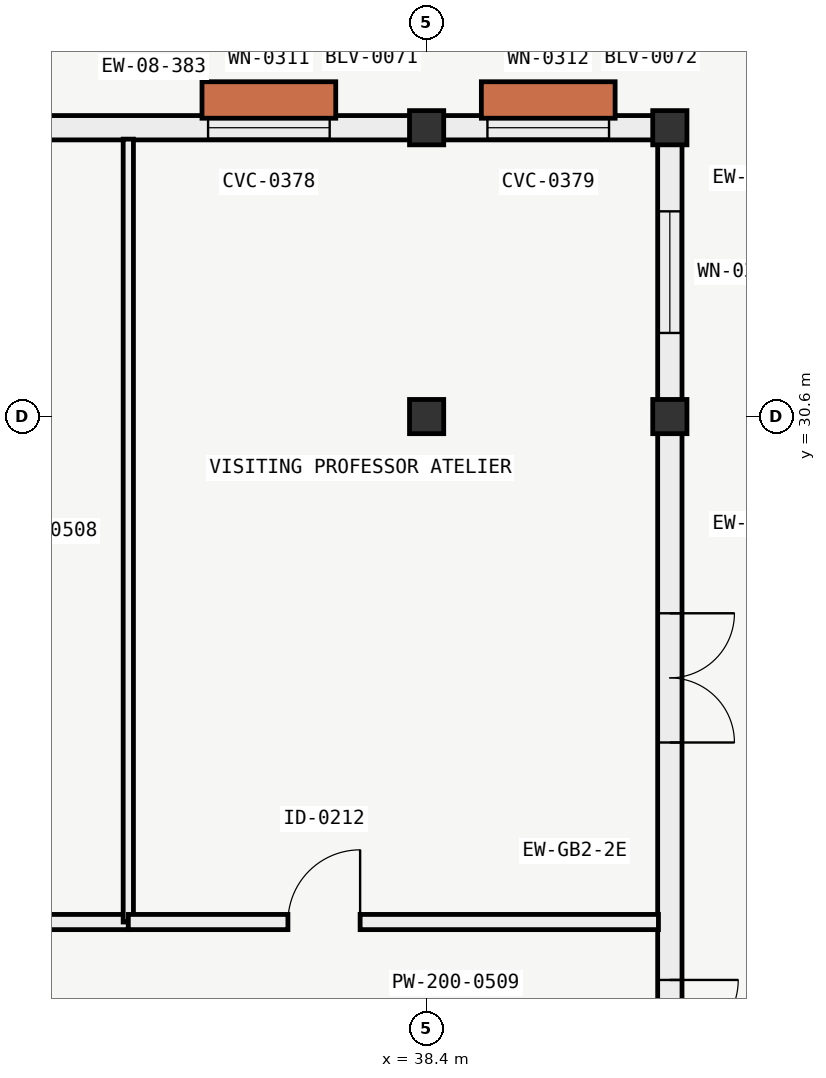
"""IFC4 building model, lengths in metres.
Left out: names, types, materials, properties, quantities, classifications, styles, units other than length and angle.
Written with IfcOpenShell. Run it as: python <this file> out.ifc"""

import sys

from ifc_helpers import new_model, si_unit, direction, frame, frame_2d, origin, origin_2d, place, context, subcontext, project, spatial, polyline, rectangle, outline, extrude, element, fill, save


model = new_model("IFC4")
c1 = context("Model", 3, precision=1e-05, world=origin(), true_north=direction((0.0, 1.0)))
c2 = subcontext(c1, "Body", "Model", "MODEL_VIEW")
j1 = project(units=[si_unit("LENGTHUNIT", "METRE"), si_unit("PLANEANGLEUNIT", "RADIAN")], contexts=[c1])
p1 = place(None, origin())
s1 = spatial("IfcSite", under=j1, at=p1, CompositionType="ELEMENT")
p2 = place(p1, origin())
s2 = spatial("IfcBuilding", under=s1, at=p2, CompositionType="ELEMENT")
p3 = place(p2, frame((0.0, 0.0, 30.6)))
s3 = spatial("IfcBuildingStorey", under=s2, at=p3, CompositionType="ELEMENT", Elevation=30.6)
for number, where, z_axis, x_axis in (
    (1, (38.4, 30.6, 0.0), (0.0, 0.0, 1.0), (1.0, 0.0, 0.0)),
    (2, (38.4, 34.4, 0.0), (0.0, 0.0, 1.0), (1.0, 0.0, 0.0)),
    (3, (41.6, 30.6, 0.0), (0.0, 0.0, 1.0), (1.0, 0.0, 0.0)),
    (4, (41.6, 34.4, 0.0), (0.0, 0.0, 1.0), (1.0, 0.0, 0.0)),
):
    element("IfcColumn", number, at=place(p3, frame(where, z_axis=z_axis, x_axis=x_axis)), inside=s3, PredefinedType="COLUMN", context=c2, shape_type="SweptSolid", body=[
        extrude(rectangle(XDim=0.45, YDim=0.45, at=origin_2d()), origin(), (0.0, 0.0, 1.0), 4.2),
    ])
p4 = place(p3, frame((41.6, 23.95, 0.0), z_axis=(0.0, 0.0, 1.0), x_axis=(0.0, -1.0, 0.0)))
e5 = element("IfcWall", 5, at=p4, inside=s3, PredefinedType="SOLIDWALL", context=c2, shape_type="SweptSolid", body=[
    extrude(rectangle(XDim=3.324, YDim=0.28, at=frame_2d((1.662, 0.0))), origin(), (0.0, 0.0, 1.0), 3.3),
])
p5 = place(p4, frame((0.762, 0.0, 0.0)))
e6 = element("IfcOpeningElement", 6, at=p5, cuts=e5, PredefinedType="OPENING", context=c2, shape_type="SweptSolid", body=[
    extrude(rectangle(XDim=1.8, YDim=2.2, at=frame_2d((0.9, 1.1))), frame((0.0, 0.15, 0.0), z_axis=(0.0, -1.0, 0.0), x_axis=(1.0, 0.0, 0.0)), (0.0, 0.0, 1.0), 0.3),
])
p6 = place(p3, frame((41.6, 30.374, 0.0), z_axis=(0.0, 0.0, 1.0), x_axis=(0.0, -1.0, 0.0)))
e7 = element("IfcWall", 7, at=p6, inside=s3, PredefinedType="SOLIDWALL", context=c2, shape_type="SweptSolid", body=[
    extrude(rectangle(XDim=6.424, YDim=0.28, at=frame_2d((3.212, 0.0))), origin(), (0.0, 0.0, 1.0), 3.3),
])
p7 = place(p6, frame((2.362, 0.0, 0.0)))
e8 = element("IfcOpeningElement", 8, at=p7, cuts=e7, PredefinedType="OPENING", context=c2, shape_type="SweptSolid", body=[
    extrude(rectangle(XDim=1.7, YDim=2.15, at=frame_2d((0.85, 1.075))), frame((0.0, 0.15, 0.0), z_axis=(0.0, -1.0, 0.0), x_axis=(1.0, 0.0, 0.0)), (0.0, 0.0, 1.0), 0.3),
])
p8 = place(p3, frame((41.6, 34.174, 0.0), z_axis=(0.0, 0.0, 1.0), x_axis=(0.0, -1.0, 0.0)))
e9 = element("IfcWall", 9, at=p8, inside=s3, PredefinedType="SOLIDWALL", context=c2, shape_type="SweptSolid", body=[
    extrude(rectangle(XDim=3.348, YDim=0.28, at=frame_2d((1.674, 0.0))), origin(), (0.0, 0.0, 1.0), 3.3),
])
p9 = place(p8, frame((0.874, 0.0, 0.85)))
e10 = element("IfcOpeningElement", 10, at=p9, cuts=e9, PredefinedType="OPENING", context=c2, shape_type="SweptSolid", body=[
    extrude(rectangle(XDim=1.6, YDim=1.9, at=frame_2d((0.8, 0.95))), frame((0.0, 0.15, 0.0), z_axis=(0.0, -1.0, 0.0), x_axis=(1.0, 0.0, 0.0)), (0.0, 0.0, 1.0), 0.3),
])
p10 = place(p3, frame((29.026, 34.4, 0.0), z_axis=(0.0, 0.0, 1.0), x_axis=(1.0, 0.0, 0.0)))
e11 = element("IfcWall", 11, at=p10, inside=s3, PredefinedType="SOLIDWALL", context=c2, shape_type="SweptSolid", body=[
    extrude(rectangle(XDim=5.449, YDim=0.28, at=frame_2d((2.725, 0.0))), origin(), (0.0, 0.0, 1.0), 3.3),
])
p11 = place(p10, frame((1.824, 0.0, 0.0)))
e12 = element("IfcOpeningElement", 12, at=p11, cuts=e11, PredefinedType="OPENING", context=c2, shape_type="SweptSolid", body=[
    extrude(rectangle(XDim=1.8, YDim=2.2, at=frame_2d((0.9, 1.1))), frame((0.0, 0.15, 0.0), z_axis=(0.0, -1.0, 0.0), x_axis=(1.0, 0.0, 0.0)), (0.0, 0.0, 1.0), 0.3),
])
p12 = place(p3, frame((34.475, 34.4, 0.0), z_axis=(0.0, 0.0, 1.0), x_axis=(1.0, 0.0, 0.0)))
e13 = element("IfcWall", 13, at=p12, inside=s3, PredefinedType="SOLIDWALL", context=c2, shape_type="SweptSolid", body=[
    extrude(rectangle(XDim=3.699, YDim=0.28, at=frame_2d((1.85, 0.0))), origin(), (0.0, 0.0, 1.0), 3.3),
])
p13 = place(p12, frame((1.05, 0.0, 0.85)))
e14 = element("IfcOpeningElement", 14, at=p13, cuts=e13, PredefinedType="OPENING", context=c2, shape_type="SweptSolid", body=[
    extrude(rectangle(XDim=1.6, YDim=1.9, at=frame_2d((0.8, 0.95))), frame((0.0, 0.15, 0.0), z_axis=(0.0, -1.0, 0.0), x_axis=(1.0, 0.0, 0.0)), (0.0, 0.0, 1.0), 0.3),
])
p14 = place(p3, frame((38.626, 34.4, 0.0), z_axis=(0.0, 0.0, 1.0), x_axis=(1.0, 0.0, 0.0)))
e15 = element("IfcWall", 15, at=p14, inside=s3, PredefinedType="SOLIDWALL", context=c2, shape_type="SweptSolid", body=[
    extrude(rectangle(XDim=2.748, YDim=0.28, at=frame_2d((1.374, 0.0))), origin(), (0.0, 0.0, 1.0), 3.3),
])
p15 = place(p14, frame((0.574, 0.0, 0.85)))
e16 = element("IfcOpeningElement", 16, at=p15, cuts=e15, PredefinedType="OPENING", context=c2, shape_type="SweptSolid", body=[
    extrude(rectangle(XDim=1.6, YDim=1.9, at=frame_2d((0.8, 0.95))), frame((0.0, 0.15, 0.0), z_axis=(0.0, -1.0, 0.0), x_axis=(1.0, 0.0, 0.0)), (0.0, 0.0, 1.0), 0.3),
])
p16 = place(p3, frame((0.0, 34.4, 4.2), z_axis=(0.0, 0.0, 1.0), x_axis=(1.0, 0.0, 0.0)))
e17 = element("IfcWall", 17, at=p16, inside=s3, PredefinedType="SOLIDWALL", context=c2, shape_type="SweptSolid", body=[
    extrude(rectangle(XDim=41.6, YDim=0.32, at=frame_2d((20.8, 0.0))), origin(), (0.0, 0.0, 1.0), 0.551),
])
p17 = place(p3, frame((41.6, 20.4, 4.2), z_axis=(0.0, 0.0, 1.0), x_axis=(0.0, 1.0, 0.0)))
e18 = element("IfcWall", 18, at=p17, inside=s3, PredefinedType="SOLIDWALL", context=c2, shape_type="SweptSolid", body=[
    extrude(outline(polyline([(0.0, 0.0), (14.0, 0.0), (14.0, 0.551), (0.0, 2.279), (0.0, 0.0)])), frame((0.0, 0.16, 0.0), z_axis=(0.0, -1.0, 0.0), x_axis=(1.0, 0.0, 0.0)), (0.0, 0.0, 1.0), 0.32),
])
p18 = place(p3, frame((27.325, 23.95, 0.0), z_axis=(0.0, 0.0, 1.0), x_axis=(1.0, 0.0, 0.0)))
e19 = element("IfcWall", 19, at=p18, inside=s3, PredefinedType="PARTITIONING", context=c2, shape_type="SweptSolid", body=[
    extrude(rectangle(XDim=7.15, YDim=0.2, at=frame_2d((3.575, 0.0))), origin(), (0.0, 0.0, 1.0), 3.85),
])
p19 = place(p18, frame((4.1, 0.0, 0.0)))
e20 = element("IfcOpeningElement", 20, at=p19, cuts=e19, PredefinedType="OPENING", context=c2, shape_type="SweptSolid", body=[
    extrude(rectangle(XDim=1.6, YDim=2.25, at=frame_2d((0.8, 1.125))), frame((0.0, 0.11, 0.0), z_axis=(0.0, -1.0, 0.0), x_axis=(1.0, 0.0, 0.0)), (0.0, 0.0, 1.0), 0.22),
])
p20 = place(p3, frame((34.475, 23.95, 0.0), z_axis=(0.0, 0.0, 1.0), x_axis=(0.0, 1.0, 0.0)))
e21 = element("IfcWall", 21, at=p20, inside=s3, PredefinedType="PARTITIONING", context=c2, shape_type="SweptSolid", body=[
    extrude(rectangle(XDim=10.3, YDim=0.135, at=frame_2d((5.15, 0.0))), origin(), (0.0, 0.0, 1.0), 3.85),
])
p21 = place(p3, frame((34.475, 23.95, 0.0), z_axis=(0.0, 0.0, 1.0), x_axis=(1.0, 0.0, 0.0)))
e22 = element("IfcWall", 22, at=p21, inside=s3, PredefinedType="PARTITIONING", context=c2, shape_type="SweptSolid", body=[
    extrude(rectangle(XDim=6.975, YDim=0.2, at=frame_2d((3.487, 0.0))), origin(), (0.0, 0.0, 1.0), 3.85),
])
p22 = place(p21, frame((2.1, 0.0, 0.0)))
e23 = element("IfcOpeningElement", 23, at=p22, cuts=e22, PredefinedType="OPENING", context=c2, shape_type="SweptSolid", body=[
    extrude(rectangle(XDim=0.95, YDim=2.1, at=frame_2d((0.475, 1.05))), frame((0.0, 0.11, 0.0), z_axis=(0.0, -1.0, 0.0), x_axis=(1.0, 0.0, 0.0)), (0.0, 0.0, 1.0), 0.22),
])
p23 = place(p5, origin())
e24 = element("IfcDoor", 24, at=p23, inside=s3, OperationType="DOUBLE_DOOR_SINGLE_SWING", PredefinedType="DOOR", context=c2, shape_type="SweptSolid", body=[
    extrude(rectangle(XDim=1.8, YDim=2.2, at=frame_2d((0.9, 1.1))), frame((0.0, 0.025, 0.0), z_axis=(0.0, -1.0, 0.0), x_axis=(1.0, 0.0, 0.0)), (0.0, 0.0, 1.0), 0.05),
])
fill(e6, e24)
p24 = place(p7, origin())
e25 = element("IfcDoor", 25, at=p24, inside=s3, OperationType="DOUBLE_DOOR_SINGLE_SWING", PredefinedType="DOOR", context=c2, shape_type="SweptSolid", body=[
    extrude(rectangle(XDim=1.7, YDim=2.15, at=frame_2d((0.85, 1.075))), frame((0.0, 0.025, 0.0), z_axis=(0.0, -1.0, 0.0), x_axis=(1.0, 0.0, 0.0)), (0.0, 0.0, 1.0), 0.05),
])
fill(e8, e25)
p25 = place(p9, origin())
e26 = element("IfcWindow", 26, at=p25, inside=s3, PartitioningType="SINGLE_PANEL", PredefinedType="WINDOW", context=c2, shape_type="SweptSolid", body=[
    extrude(rectangle(XDim=1.6, YDim=1.9, at=frame_2d((0.8, 0.95))), frame((0.0, 0.03, 0.0), z_axis=(0.0, -1.0, 0.0), x_axis=(1.0, 0.0, 0.0)), (0.0, 0.0, 1.0), 0.06),
])
fill(e10, e26)
p26 = place(p13, origin())
e27 = element("IfcWindow", 27, at=p26, inside=s3, PartitioningType="SINGLE_PANEL", PredefinedType="WINDOW", context=c2, shape_type="SweptSolid", body=[
    extrude(rectangle(XDim=1.6, YDim=1.9, at=frame_2d((0.8, 0.95))), frame((0.0, 0.03, 0.0), z_axis=(0.0, -1.0, 0.0), x_axis=(1.0, 0.0, 0.0)), (0.0, 0.0, 1.0), 0.06),
])
fill(e14, e27)
p27 = place(p15, origin())
e28 = element("IfcWindow", 28, at=p27, inside=s3, PartitioningType="SINGLE_PANEL", PredefinedType="WINDOW", context=c2, shape_type="SweptSolid", body=[
    extrude(rectangle(XDim=1.6, YDim=1.9, at=frame_2d((0.8, 0.95))), frame((0.0, 0.03, 0.0), z_axis=(0.0, -1.0, 0.0), x_axis=(1.0, 0.0, 0.0)), (0.0, 0.0, 1.0), 0.06),
])
fill(e16, e28)
p28 = place(p22, origin())
e29 = element("IfcDoor", 29, at=p28, inside=s3, OperationType="SINGLE_SWING_RIGHT", PredefinedType="DOOR", context=c2, shape_type="SweptSolid", body=[
    extrude(rectangle(XDim=0.95, YDim=2.1, at=frame_2d((0.475, 1.05))), frame((0.0, 0.025, 0.0), z_axis=(0.0, -1.0, 0.0), x_axis=(1.0, 0.0, 0.0)), (0.0, 0.0, 1.0), 0.05),
])
fill(e23, e29)
save(model, sys.argv[1])
